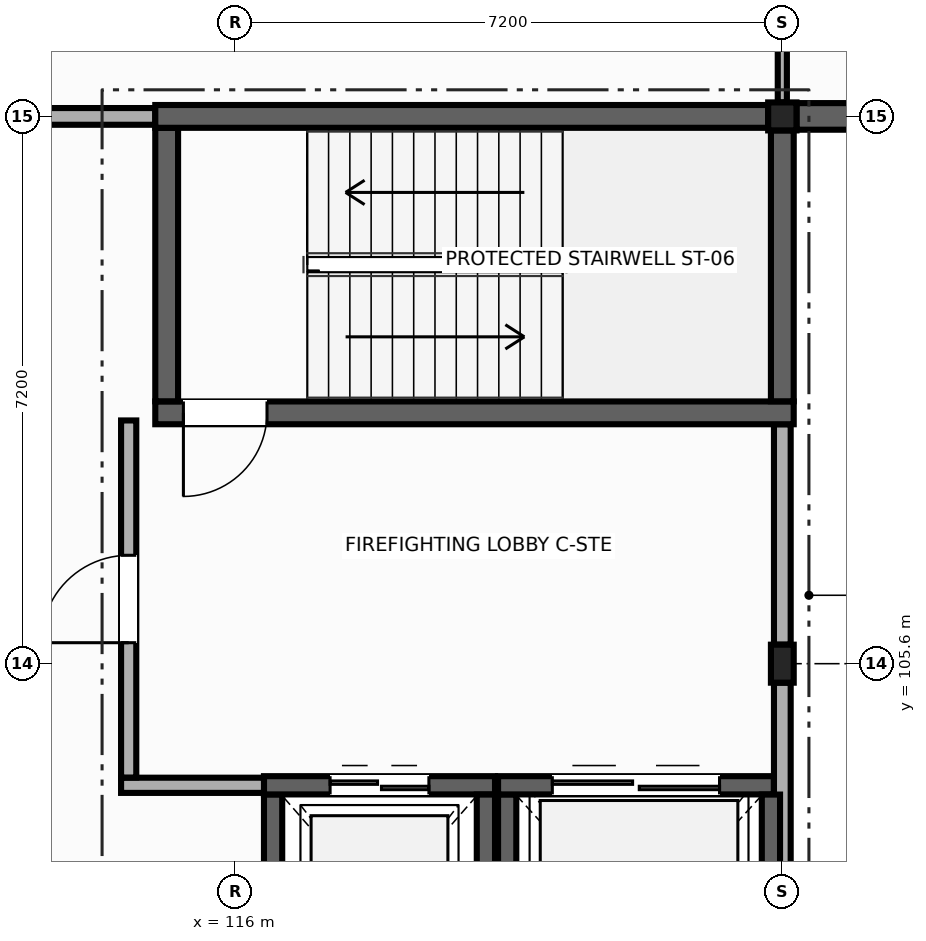
"""IFC4 building model, lengths in metres.
Left out: names, types, materials, properties, quantities, classifications, styles, units other than length and angle.
Written with IfcOpenShell. Run it as: python <this file> out.ifc"""

import sys

from ifc_helpers import new_model, si_unit, direction, frame, frame_2d, origin, origin_2d, place, context, subcontext, project, spatial, rectangle, i_section, extrude, element, fill, save


model = new_model("IFC4")
c1 = context("Model", 3, precision=1e-05, world=origin(), true_north=direction((0.0, 1.0)))
c2 = subcontext(c1, "Body", "Model", "MODEL_VIEW")
j1 = project(units=[si_unit("LENGTHUNIT", "METRE"), si_unit("PLANEANGLEUNIT", "RADIAN")], contexts=[c1])
p1 = place(None, origin())
s1 = spatial("IfcSite", under=j1, at=p1, CompositionType="ELEMENT")
p2 = place(p1, origin())
s2 = spatial("IfcBuilding", under=s1, at=p2, CompositionType="ELEMENT")
p3 = place(p2, frame((0.0, 0.0, 5.4)))
s3 = spatial("IfcBuildingStorey", under=s2, at=p3, CompositionType="ELEMENT", Elevation=5.4)
p4 = place(p3, frame((123.2, 105.6, 0.0), z_axis=(0.0, 0.0, 1.0), x_axis=(1.0, 0.0, 0.0)))
e1 = element("IfcColumn", 1, at=p4, inside=s3, PredefinedType="COLUMN", context=c2, shape_type="SweptSolid", body=[
    extrude(i_section(OverallWidth=0.3, OverallDepth=0.5, WebThickness=0.014, FlangeThickness=0.028, at=origin_2d()), origin(), (0.0, 0.0, 1.0), 4.5),
])
p5 = place(p3, frame((123.2, 112.8, 0.0), z_axis=(0.0, 0.0, 1.0), x_axis=(1.0, 0.0, 0.0)))
e2 = element("IfcColumn", 2, at=p5, inside=s3, PredefinedType="COLUMN", context=c2, shape_type="SweptSolid", body=[
    extrude(i_section(OverallWidth=0.373, OverallDepth=0.368, WebThickness=0.014, FlangeThickness=0.024, at=origin_2d()), origin(), (0.0, 0.0, 1.0), 4.5),
])
p6 = place(p3, frame((109.05, 112.8, 0.0), z_axis=(0.0, 0.0, 1.0), x_axis=(1.0, 0.0, 0.0)))
e3 = element("IfcWall", 3, at=p6, inside=s3, PredefinedType="SOLIDWALL", context=c2, shape_type="SweptSolid", body=[
    extrude(rectangle(XDim=5.9, YDim=0.22, at=frame_2d((2.95, 0.0))), origin(), (0.0, 0.0, 1.0), 4.22),
])
p7 = place(p6, frame((2.85, 0.0, 0.0)))
e4 = element("IfcOpeningElement", 4, at=p7, cuts=e3, PredefinedType="OPENING", context=c2, shape_type="SweptSolid", body=[
    extrude(rectangle(XDim=1.1, YDim=2.15, at=frame_2d((0.55, 1.075))), frame((0.0, 0.12, 0.0), z_axis=(0.0, -1.0, 0.0), x_axis=(1.0, 0.0, 0.0)), (0.0, 0.0, 1.0), 0.24),
])
p8 = place(p3, frame((123.2, 108.75, 0.0), z_axis=(0.0, 0.0, 1.0), x_axis=(0.0, -1.0, 0.0)))
e5 = element("IfcWall", 5, at=p8, inside=s3, PredefinedType="SOLIDWALL", context=c2, shape_type="SweptSolid", body=[
    extrude(rectangle(XDim=2.9, YDim=0.22, at=frame_2d((1.45, 0.0))), origin(), (0.0, 0.0, 1.0), 3.515),
])
p9 = place(p3, frame((123.2, 105.35, 0.0), z_axis=(0.0, 0.0, 1.0), x_axis=(0.0, -1.0, 0.0)))
e6 = element("IfcWall", 6, at=p9, inside=s3, PredefinedType="SOLIDWALL", context=c2, shape_type="SweptSolid", body=[
    extrude(rectangle(XDim=6.8, YDim=0.22, at=frame_2d((3.4, 0.0))), origin(), (0.0, 0.0, 1.0), 3.555),
])
p10 = place(p3, frame((130.05, 112.8, 0.0), z_axis=(0.0, 0.0, 1.0), x_axis=(-1.0, 0.0, 0.0)))
e7 = element("IfcWall", 7, at=p10, inside=s3, PredefinedType="SOLIDWALL", context=c2, shape_type="SweptSolid", body=[
    extrude(rectangle(XDim=6.664, YDim=0.35, at=frame_2d((3.332, 0.0))), origin(), (0.0, 0.0, 1.0), 4.22),
])
p11 = place(p10, frame((2.132, 0.0, 0.9)))
e8 = element("IfcOpeningElement", 8, at=p11, cuts=e7, PredefinedType="OPENING", context=c2, shape_type="SweptSolid", body=[
    extrude(rectangle(XDim=2.4, YDim=1.8, at=frame_2d((1.2, 0.9))), frame((0.0, 0.185, 0.0), z_axis=(0.0, -1.0, 0.0), x_axis=(1.0, 0.0, 0.0)), (0.0, 0.0, 1.0), 0.37),
])
p12 = place(p3, frame((123.35, 108.9, 0.0), z_axis=(0.0, 0.0, 1.0), x_axis=(-1.0, 0.0, 0.0)))
e9 = element("IfcWall", 9, at=p12, inside=s3, PredefinedType="SHEAR", context=c2, shape_type="SweptSolid", body=[
    extrude(rectangle(XDim=8.4, YDim=0.3, at=frame_2d((4.2, 0.0))), origin(), (0.0, 0.0, 1.0), 4.26),
])
p13 = place(p12, frame((6.93, 0.0, 0.0)))
e10 = element("IfcOpeningElement", 10, at=p13, cuts=e9, PredefinedType="OPENING", context=c2, shape_type="SweptSolid", body=[
    extrude(rectangle(XDim=1.1, YDim=2.15, at=frame_2d((0.55, 1.075))), frame((0.0, 0.16, 0.0), z_axis=(0.0, -1.0, 0.0), x_axis=(1.0, 0.0, 0.0)), (0.0, 0.0, 1.0), 0.32),
])
p14 = place(p3, frame((115.1, 109.052, 0.0), z_axis=(0.0, 0.0, 1.0), x_axis=(0.0, 1.0, 0.0)))
e11 = element("IfcWall", 11, at=p14, inside=s3, PredefinedType="SHEAR", context=c2, shape_type="SweptSolid", body=[
    extrude(rectangle(XDim=3.598, YDim=0.3, at=frame_2d((1.799, 0.0))), origin(), (0.0, 0.0, 1.0), 4.26),
])
p15 = place(p3, frame((114.95, 112.8, 0.0), z_axis=(0.0, 0.0, 1.0), x_axis=(1.0, 0.0, 0.0)))
e12 = element("IfcWall", 12, at=p15, inside=s3, PredefinedType="SHEAR", context=c2, shape_type="SweptSolid", body=[
    extrude(rectangle(XDim=8.064, YDim=0.3, at=frame_2d((4.032, 0.0))), origin(), (0.0, 0.0, 1.0), 4.22),
])
p16 = place(p3, frame((123.2, 112.616, 0.0), z_axis=(0.0, 0.0, 1.0), x_axis=(0.0, -1.0, 0.0)))
e13 = element("IfcWall", 13, at=p16, inside=s3, PredefinedType="SHEAR", context=c2, shape_type="SweptSolid", body=[
    extrude(rectangle(XDim=3.564, YDim=0.3, at=frame_2d((1.782, 0.0))), origin(), (0.0, 0.0, 1.0), 4.26),
])
p17 = place(p3, frame((116.5, 100.922, 0.0), z_axis=(0.0, 0.0, 1.0), x_axis=(0.0, 1.0, 0.0)))
e14 = element("IfcWall", 14, at=p17, inside=s3, PredefinedType="SHEAR", context=c2, shape_type="SweptSolid", body=[
    extrude(rectangle(XDim=2.958, YDim=0.24, at=frame_2d((1.479, 0.0))), origin(), (0.0, 0.0, 1.0), 4.26),
])
p18 = place(p3, frame((116.38, 104.0, 0.0), z_axis=(0.0, 0.0, 1.0), x_axis=(1.0, 0.0, 0.0)))
e15 = element("IfcWall", 15, at=p18, inside=s3, PredefinedType="SHEAR", context=c2, shape_type="SweptSolid", body=[
    extrude(rectangle(XDim=3.04, YDim=0.24, at=frame_2d((1.52, 0.0))), origin(), (0.0, 0.0, 1.0), 4.26),
])
p19 = place(p18, frame((0.87, 0.0, 0.0)))
e16 = element("IfcOpeningElement", 16, at=p19, cuts=e15, PredefinedType="OPENING", context=c2, shape_type="SweptSolid", body=[
    extrude(rectangle(XDim=1.3, YDim=2.15, at=frame_2d((0.65, 1.075))), frame((0.0, 0.13, 0.0), z_axis=(0.0, -1.0, 0.0), x_axis=(1.0, 0.0, 0.0)), (0.0, 0.0, 1.0), 0.26),
])
p20 = place(p3, frame((119.3, 103.878, 0.0), z_axis=(0.0, 0.0, 1.0), x_axis=(0.0, -1.0, 0.0)))
e17 = element("IfcWall", 17, at=p20, inside=s3, PredefinedType="SHEAR", context=c2, shape_type="SweptSolid", body=[
    extrude(rectangle(XDim=2.956, YDim=0.24, at=frame_2d((1.478, 0.0))), origin(), (0.0, 0.0, 1.0), 4.26),
])
p21 = place(p3, frame((119.58, 100.322, 0.0), z_axis=(0.0, 0.0, 1.0), x_axis=(0.0, 1.0, 0.0)))
e18 = element("IfcWall", 18, at=p21, inside=s3, PredefinedType="SHEAR", context=c2, shape_type="SweptSolid", body=[
    extrude(rectangle(XDim=3.558, YDim=0.24, at=frame_2d((1.779, 0.0))), origin(), (0.0, 0.0, 1.0), 4.26),
])
p22 = place(p3, frame((119.46, 104.0, 0.0), z_axis=(0.0, 0.0, 1.0), x_axis=(1.0, 0.0, 0.0)))
e19 = element("IfcWall", 19, at=p22, inside=s3, PredefinedType="SHEAR", context=c2, shape_type="SweptSolid", body=[
    extrude(rectangle(XDim=3.628, YDim=0.24, at=frame_2d((1.814, 0.0))), origin(), (0.0, 0.0, 1.0), 4.26),
])
p23 = place(p22, frame((0.714, 0.0, 0.0)))
e20 = element("IfcOpeningElement", 20, at=p23, cuts=e19, PredefinedType="OPENING", context=c2, shape_type="SweptSolid", body=[
    extrude(rectangle(XDim=2.2, YDim=2.5, at=frame_2d((1.1, 1.25))), frame((0.0, 0.13, 0.0), z_axis=(0.0, -1.0, 0.0), x_axis=(1.0, 0.0, 0.0)), (0.0, 0.0, 1.0), 0.26),
])
p24 = place(p3, frame((123.05, 103.878, 0.0), z_axis=(0.0, 0.0, 1.0), x_axis=(0.0, -1.0, 0.0)))
e21 = element("IfcWall", 21, at=p24, inside=s3, PredefinedType="SHEAR", context=c2, shape_type="SweptSolid", body=[
    extrude(rectangle(XDim=3.556, YDim=0.24, at=frame_2d((1.778, 0.0))), origin(), (0.0, 0.0, 1.0), 4.26),
])
p25 = place(p3, frame((116.38, 104.0, 0.0), z_axis=(0.0, 0.0, 1.0), x_axis=(-1.0, 0.0, 0.0)))
e22 = element("IfcWall", 22, at=p25, inside=s3, PredefinedType="PARTITIONING", context=c2, shape_type="SweptSolid", body=[
    extrude(rectangle(XDim=1.88, YDim=0.2, at=frame_2d((0.94, 0.0))), origin(), (0.0, 0.0, 1.0), 4.26),
])
p26 = place(p3, frame((114.6, 104.102, 0.0), z_axis=(0.0, 0.0, 1.0), x_axis=(0.0, 1.0, 0.0)))
e23 = element("IfcWall", 23, at=p26, inside=s3, PredefinedType="PARTITIONING", context=c2, shape_type="SweptSolid", body=[
    extrude(rectangle(XDim=4.698, YDim=0.2, at=frame_2d((2.349, 0.0))), origin(), (0.0, 0.0, 1.0), 4.26),
])
p27 = place(p26, frame((1.774, 0.0, 0.0)))
e24 = element("IfcOpeningElement", 24, at=p27, cuts=e23, PredefinedType="OPENING", context=c2, shape_type="SweptSolid", body=[
    extrude(rectangle(XDim=1.15, YDim=2.15, at=frame_2d((0.575, 1.075))), frame((0.0, 0.11, 0.0), z_axis=(0.0, -1.0, 0.0), x_axis=(1.0, 0.0, 0.0)), (0.0, 0.0, 1.0), 0.22),
])
p28 = place(p3, frame((123.2, 119.65, 0.0), z_axis=(0.0, 0.0, 1.0), x_axis=(0.0, -1.0, 0.0)))
e25 = element("IfcWall", 25, at=p28, inside=s3, PredefinedType="PARTITIONING", context=c2, shape_type="SweptSolid", body=[
    extrude(rectangle(XDim=6.666, YDim=0.12, at=frame_2d((3.333, 0.0))), origin(), (0.0, 0.0, 1.0), 3.515),
])
p29 = place(p13, origin())
e26 = element("IfcDoor", 26, at=p29, inside=s3, OperationType="SINGLE_SWING_RIGHT", PredefinedType="DOOR", context=c2, shape_type="SweptSolid", body=[
    extrude(rectangle(XDim=1.1, YDim=2.15, at=frame_2d((0.55, 1.075))), frame((0.0, 0.025, 0.0), z_axis=(0.0, -1.0, 0.0), x_axis=(1.0, 0.0, 0.0)), (0.0, 0.0, 1.0), 0.05),
])
fill(e10, e26)
p30 = place(p19, origin())
e27 = element("IfcDoor", 27, at=p30, inside=s3, OperationType="DOUBLE_DOOR_SLIDING", PredefinedType="DOOR", context=c2, shape_type="SweptSolid", body=[
    extrude(rectangle(XDim=1.3, YDim=2.15, at=frame_2d((0.65, 1.075))), frame((0.0, 0.025, 0.0), z_axis=(0.0, -1.0, 0.0), x_axis=(1.0, 0.0, 0.0)), (0.0, 0.0, 1.0), 0.05),
])
fill(e16, e27)
p31 = place(p23, origin())
e28 = element("IfcDoor", 28, at=p31, inside=s3, OperationType="DOUBLE_DOOR_SLIDING", PredefinedType="DOOR", context=c2, shape_type="SweptSolid", body=[
    extrude(rectangle(XDim=2.2, YDim=2.5, at=frame_2d((1.1, 1.25))), frame((0.0, 0.025, 0.0), z_axis=(0.0, -1.0, 0.0), x_axis=(1.0, 0.0, 0.0)), (0.0, 0.0, 1.0), 0.05),
])
fill(e20, e28)
p32 = place(p27, origin())
e29 = element("IfcDoor", 29, at=p32, inside=s3, OperationType="SINGLE_SWING_LEFT", PredefinedType="DOOR", context=c2, shape_type="SweptSolid", body=[
    extrude(rectangle(XDim=1.15, YDim=2.15, at=frame_2d((0.575, 1.075))), frame((0.0, 0.025, 0.0), z_axis=(0.0, -1.0, 0.0), x_axis=(1.0, 0.0, 0.0)), (0.0, 0.0, 1.0), 0.05),
])
fill(e24, e29)
save(model, sys.argv[1])
